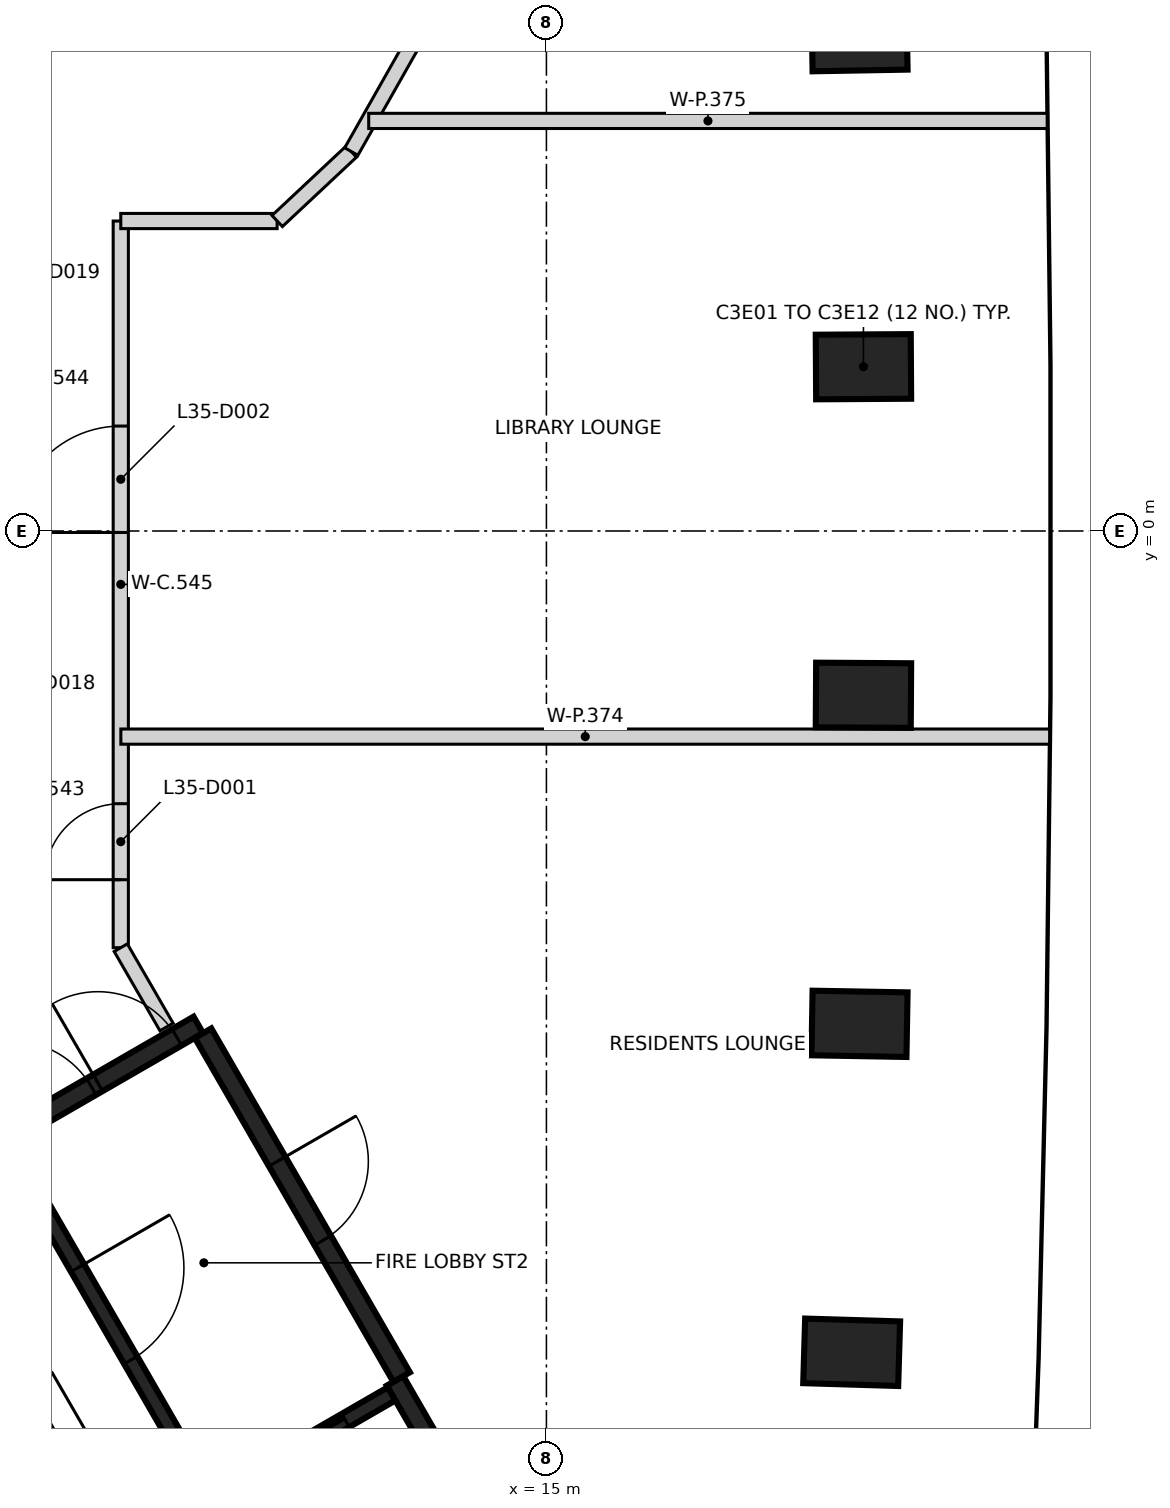
"""IFC4 building model, lengths in metres.
Left out: names, types, materials, properties, quantities, classifications, styles, units other than length and angle.
Written with IfcOpenShell. Run it as: python <this file> out.ifc"""

import sys

from ifc_helpers import new_model, si_unit, direction, frame, frame_2d, origin, origin_2d, place, context, subcontext, project, spatial, rectangle, extrude, element, fill, save


model = new_model("IFC4")
c1 = context("Model", 3, precision=1e-05, world=origin(), true_north=direction((0.0, 1.0)))
c2 = subcontext(c1, "Body", "Model", "MODEL_VIEW")
j1 = project(units=[si_unit("LENGTHUNIT", "METRE"), si_unit("PLANEANGLEUNIT", "RADIAN")], contexts=[c1])
p1 = place(None, origin())
s1 = spatial("IfcSite", under=j1, at=p1, CompositionType="ELEMENT")
p2 = place(p1, origin())
s2 = spatial("IfcBuilding", under=s1, at=p2, CompositionType="ELEMENT")
p3 = place(p2, frame((0.0, 0.0, 143.2)))
s3 = spatial("IfcBuildingStorey", under=s2, at=p3, CompositionType="ELEMENT", Elevation=143.2)
for number, where, z_axis, x_axis in (
    (1, (19.016, -10.805, -0.4), (0.0, 0.0, 1.0), (-1.0, 0.03, 0.0)),
    (2, (19.119, -6.484, -0.4), (0.0, 0.0, 1.0), (-1.0, 0.018, 0.0)),
    (3, (19.171, -2.161, -0.4), (0.0, 0.0, 1.0), (-1.0, 0.006, 0.0)),
    (4, (19.171, 2.161, -0.4), (0.0, 0.0, 1.0), (1.0, 0.006, 0.0)),
    (5, (19.119, 6.484, -0.4), (0.0, 0.0, 1.0), (1.0, 0.018, 0.0)),
):
    element("IfcColumn", number, at=place(p3, frame(where, z_axis=z_axis, x_axis=x_axis)), inside=s3, PredefinedType="COLUMN", context=c2, shape_type="SweptSolid", body=[
        extrude(rectangle(XDim=1.25, YDim=0.85, at=origin_2d()), origin(), (0.0, 0.0, 1.0), 3.6),
    ])
p4 = place(p3, frame((0.417, -12.273, 0.0), z_axis=(0.0, 0.0, 1.0), x_axis=(0.866021906294, 0.500006057782, 0.0)))
e6 = element("IfcWall", 6, at=p4, inside=s3, PredefinedType="SHEAR", context=c2, shape_type="SweptSolid", body=[
    extrude(rectangle(XDim=11.55, YDim=0.25, at=frame_2d((5.775, 0.0))), origin(), (0.0, 0.0, 1.0), 3.2),
])
p5 = place(p4, frame((10.025, 0.0, 0.0)))
e7 = element("IfcOpeningElement", 7, at=p5, cuts=e6, PredefinedType="OPENING", context=c2, shape_type="SweptSolid", body=[
    extrude(rectangle(XDim=1.2, YDim=2.1, at=frame_2d((0.6, 1.05))), frame((0.0, 0.135, 0.0), z_axis=(0.0, -1.0, 0.0), x_axis=(1.0, 0.0, 0.0)), (0.0, 0.0, 1.0), 0.27),
])
p6 = place(p4, frame((8.725, 0.0, 0.0)))
e8 = element("IfcOpeningElement", 8, at=p6, cuts=e6, PredefinedType="OPENING", context=c2, shape_type="SweptSolid", body=[
    extrude(rectangle(XDim=1.2, YDim=2.1, at=frame_2d((0.6, 1.05))), frame((0.0, 0.135, 0.0), z_axis=(0.0, -1.0, 0.0), x_axis=(1.0, 0.0, 0.0)), (0.0, 0.0, 1.0), 0.27),
])
p7 = place(p3, frame((13.008, -11.181, 0.0), z_axis=(0.0, 0.0, 1.0), x_axis=(0.500004234368, -0.866022959057, 0.0)))
e9 = element("IfcWall", 9, at=p7, inside=s3, PredefinedType="SHEAR", context=c2, shape_type="SweptSolid", body=[
    extrude(rectangle(XDim=6.25, YDim=0.25, at=frame_2d((3.125, 0.0))), origin(), (0.0, 0.0, 1.0), 3.2),
])
p8 = place(p3, frame((10.483, -6.606, 0.0), z_axis=(0.0, 0.0, 1.0), x_axis=(0.49999885962, -0.866026062182, 0.0)))
e10 = element("IfcWall", 10, at=p8, inside=s3, PredefinedType="SHEAR", context=c2, shape_type="SweptSolid", body=[
    extrude(rectangle(XDim=5.225, YDim=0.25, at=frame_2d((2.612, 0.0))), origin(), (0.0, 0.0, 1.0), 3.2),
])
p9 = place(p8, frame((1.95, 0.0, 0.0)))
e11 = element("IfcOpeningElement", 11, at=p9, cuts=e10, PredefinedType="OPENING", context=c2, shape_type="SweptSolid", body=[
    extrude(rectangle(XDim=1.2, YDim=2.1, at=frame_2d((0.6, 1.05))), frame((0.0, 0.135, 0.0), z_axis=(0.0, -1.0, 0.0), x_axis=(1.0, 0.0, 0.0)), (0.0, 0.0, 1.0), 0.27),
])
p10 = place(p3, frame((7.906, -8.094, 0.0), z_axis=(0.0, 0.0, 1.0), x_axis=(0.500024287448, -0.866011380966, 0.0)))
e12 = element("IfcWall", 12, at=p10, inside=s3, PredefinedType="SHEAR", context=c2, shape_type="SweptSolid", body=[
    extrude(rectangle(XDim=5.251, YDim=0.2, at=frame_2d((2.625, 0.0))), origin(), (0.0, 0.0, 1.0), 3.2),
])
p11 = place(p10, frame((1.849, 0.0, 0.0)))
e13 = element("IfcOpeningElement", 13, at=p11, cuts=e12, PredefinedType="OPENING", context=c2, shape_type="SweptSolid", body=[
    extrude(rectangle(XDim=1.4, YDim=2.1, at=frame_2d((0.7, 1.05))), frame((0.0, 0.11, 0.0), z_axis=(0.0, -1.0, 0.0), x_axis=(1.0, 0.0, 0.0)), (0.0, 0.0, 1.0), 0.22),
])
p12 = place(p3, frame((10.587, -12.723, 0.0), z_axis=(0.0, 0.0, 1.0), x_axis=(0.866037306777, 0.499979382845, 0.0)))
e14 = element("IfcWall", 14, at=p12, inside=s3, PredefinedType="SHEAR", context=c2, shape_type="SweptSolid", body=[
    extrude(rectangle(XDim=2.742, YDim=0.2, at=frame_2d((1.371, 0.0))), origin(), (0.0, 0.0, 1.0), 3.2),
])
p13 = place(p12, frame((0.743, 0.0, 0.0)))
e15 = element("IfcOpeningElement", 15, at=p13, cuts=e14, PredefinedType="OPENING", context=c2, shape_type="SweptSolid", body=[
    extrude(rectangle(XDim=1.3, YDim=2.1, at=frame_2d((0.65, 1.05))), frame((0.0, 0.11, 0.0), z_axis=(0.0, -1.0, 0.0), x_axis=(1.0, 0.0, 0.0)), (0.0, 0.0, 1.0), 0.22),
])
p14 = place(p3, frame((9.4, -5.482, 0.0), z_axis=(0.0, 0.0, 1.0), x_axis=(0.0, 1.0, 0.0)))
e16 = element("IfcWall", 16, at=p14, inside=s3, PredefinedType="PARTITIONING", context=c2, shape_type="SweptSolid", body=[
    extrude(rectangle(XDim=9.56, YDim=0.2, at=frame_2d((4.78, 0.0))), origin(), (0.0, 0.0, 1.0), 3.2),
])
p15 = place(p14, frame((0.895, 0.0, 0.0)))
e17 = element("IfcOpeningElement", 17, at=p15, cuts=e16, PredefinedType="OPENING", context=c2, shape_type="SweptSolid", body=[
    extrude(rectangle(XDim=1.0, YDim=2.1, at=frame_2d((0.5, 1.05))), frame((0.0, 0.11, 0.0), z_axis=(0.0, -1.0, 0.0), x_axis=(1.0, 0.0, 0.0)), (0.0, 0.0, 1.0), 0.22),
])
p16 = place(p14, frame((5.462, 0.0, 0.0)))
e18 = element("IfcOpeningElement", 18, at=p16, cuts=e16, PredefinedType="OPENING", context=c2, shape_type="SweptSolid", body=[
    extrude(rectangle(XDim=1.4, YDim=2.1, at=frame_2d((0.7, 1.05))), frame((0.0, 0.11, 0.0), z_axis=(0.0, -1.0, 0.0), x_axis=(1.0, 0.0, 0.0)), (0.0, 0.0, 1.0), 0.22),
])
p17 = place(p3, frame((9.4, -5.482, 0.0), z_axis=(0.0, 0.0, 1.0), x_axis=(0.499909562097, -0.866077611837, 0.0)))
e19 = element("IfcWall", 19, at=p17, inside=s3, PredefinedType="PARTITIONING", context=c2, shape_type="SweptSolid", body=[
    extrude(rectangle(XDim=1.205, YDim=0.2, at=frame_2d((0.603, 0.0))), origin(), (0.0, 0.0, 1.0), 3.2),
])
p18 = place(p3, frame((9.4, 4.078, 0.0), z_axis=(0.0, 0.0, 1.0), x_axis=(1.0, 0.0, 0.0)))
e20 = element("IfcWall", 20, at=p18, inside=s3, PredefinedType="PARTITIONING", context=c2, shape_type="SweptSolid", body=[
    extrude(rectangle(XDim=2.057, YDim=0.2, at=frame_2d((1.029, 0.0))), origin(), (0.0, 0.0, 1.0), 3.2),
])
p19 = place(p3, frame((11.458, 4.078, 0.0), z_axis=(0.0, 0.0, 1.0), x_axis=(0.729936032318, 0.683515463412, 0.0)))
e21 = element("IfcWall", 21, at=p19, inside=s3, PredefinedType="PARTITIONING", context=c2, shape_type="SweptSolid", body=[
    extrude(rectangle(XDim=1.336, YDim=0.2, at=frame_2d((0.668, 0.0))), origin(), (0.0, 0.0, 1.0), 3.2),
])
p20 = place(p3, frame((12.433, 4.992, 0.0), z_axis=(0.0, 0.0, 1.0), x_axis=(0.492740203499, 0.870176471675, 0.0)))
e22 = element("IfcWall", 22, at=p20, inside=s3, PredefinedType="PARTITIONING", context=c2, shape_type="SweptSolid", body=[
    extrude(rectangle(XDim=6.265, YDim=0.2, at=frame_2d((3.133, 0.0))), origin(), (0.0, 0.0, 1.0), 3.2),
])
p21 = place(p20, frame((2.858, 0.0, 0.0)))
e23 = element("IfcOpeningElement", 23, at=p21, cuts=e22, PredefinedType="OPENING", context=c2, shape_type="SweptSolid", body=[
    extrude(rectangle(XDim=1.0, YDim=2.1, at=frame_2d((0.5, 1.05))), frame((0.0, 0.11, 0.0), z_axis=(0.0, -1.0, 0.0), x_axis=(1.0, 0.0, 0.0)), (0.0, 0.0, 1.0), 0.22),
])
p22 = place(p3, frame((9.401, -2.705, 0.0), z_axis=(0.0, 0.0, 1.0), x_axis=(1.0, 0.0, 0.0)))
e24 = element("IfcWall", 24, at=p22, inside=s3, PredefinedType="PARTITIONING", context=c2, shape_type="SweptSolid", body=[
    extrude(rectangle(XDim=12.219, YDim=0.2, at=frame_2d((6.11, 0.0))), origin(), (0.0, 0.0, 1.0), 2.3),
])
p23 = place(p3, frame((12.662, 5.395, 0.0), z_axis=(0.0, 0.0, 1.0), x_axis=(1.0, 0.0, 0.0)))
e25 = element("IfcWall", 25, at=p23, inside=s3, PredefinedType="PARTITIONING", context=c2, shape_type="SweptSolid", body=[
    extrude(rectangle(XDim=8.926, YDim=0.2, at=frame_2d((4.463, 0.0))), origin(), (0.0, 0.0, 1.0), 2.3),
])
p24 = place(p13, origin())
e26 = element("IfcDoor", 26, at=p24, inside=s3, OperationType="SLIDING_TO_RIGHT", PredefinedType="DOOR", context=c2, shape_type="SweptSolid", body=[
    extrude(rectangle(XDim=1.3, YDim=2.1, at=frame_2d((0.65, 1.05))), frame((0.0, 0.025, 0.0), z_axis=(0.0, -1.0, 0.0), x_axis=(1.0, 0.0, 0.0)), (0.0, 0.0, 1.0), 0.05),
])
fill(e15, e26)
p25 = place(p5, origin())
e27 = element("IfcDoor", 27, at=p25, inside=s3, OperationType="SINGLE_SWING_LEFT", PredefinedType="DOOR", context=c2, shape_type="SweptSolid", body=[
    extrude(rectangle(XDim=1.2, YDim=2.1, at=frame_2d((0.6, 1.05))), frame((0.0, 0.025, 0.0), z_axis=(0.0, -1.0, 0.0), x_axis=(1.0, 0.0, 0.0)), (0.0, 0.0, 1.0), 0.05),
])
fill(e7, e27)
p26 = place(p6, origin())
e28 = element("IfcDoor", 28, at=p26, inside=s3, OperationType="SINGLE_SWING_RIGHT", PredefinedType="DOOR", context=c2, shape_type="SweptSolid", body=[
    extrude(rectangle(XDim=1.2, YDim=2.1, at=frame_2d((0.6, 1.05))), frame((0.0, 0.025, 0.0), z_axis=(0.0, -1.0, 0.0), x_axis=(1.0, 0.0, 0.0)), (0.0, 0.0, 1.0), 0.05),
])
fill(e8, e28)
p27 = place(p11, origin())
e29 = element("IfcDoor", 29, at=p27, inside=s3, OperationType="SINGLE_SWING_RIGHT", PredefinedType="DOOR", context=c2, shape_type="SweptSolid", body=[
    extrude(rectangle(XDim=1.4, YDim=2.1, at=frame_2d((0.7, 1.05))), frame((0.0, 0.025, 0.0), z_axis=(0.0, -1.0, 0.0), x_axis=(1.0, 0.0, 0.0)), (0.0, 0.0, 1.0), 0.05),
])
fill(e13, e29)
p28 = place(p9, origin())
e30 = element("IfcDoor", 30, at=p28, inside=s3, OperationType="SINGLE_SWING_LEFT", PredefinedType="DOOR", context=c2, shape_type="SweptSolid", body=[
    extrude(rectangle(XDim=1.2, YDim=2.1, at=frame_2d((0.6, 1.05))), frame((0.0, 0.025, 0.0), z_axis=(0.0, -1.0, 0.0), x_axis=(1.0, 0.0, 0.0)), (0.0, 0.0, 1.0), 0.05),
])
fill(e11, e30)
p29 = place(p15, frame((1.0, 0.0, 0.0), z_axis=(0.0, 0.0, 1.0), x_axis=(-1.0, 0.0, 0.0)))
e31 = element("IfcDoor", 31, at=p29, inside=s3, OperationType="SINGLE_SWING_LEFT", PredefinedType="DOOR", context=c2, shape_type="SweptSolid", body=[
    extrude(rectangle(XDim=1.0, YDim=2.1, at=frame_2d((0.5, 1.05))), frame((0.0, 0.025, 0.0), z_axis=(0.0, -1.0, 0.0), x_axis=(1.0, 0.0, 0.0)), (0.0, 0.0, 1.0), 0.05),
])
fill(e17, e31)
p30 = place(p16, frame((1.4, 0.0, 0.0), z_axis=(0.0, 0.0, 1.0), x_axis=(-1.0, 0.0, 0.0)))
e32 = element("IfcDoor", 32, at=p30, inside=s3, OperationType="DOUBLE_DOOR_SINGLE_SWING", PredefinedType="DOOR", context=c2, shape_type="SweptSolid", body=[
    extrude(rectangle(XDim=1.4, YDim=2.1, at=frame_2d((0.7, 1.05))), frame((0.0, 0.025, 0.0), z_axis=(0.0, -1.0, 0.0), x_axis=(1.0, 0.0, 0.0)), (0.0, 0.0, 1.0), 0.05),
])
fill(e18, e32)
save(model, sys.argv[1])
